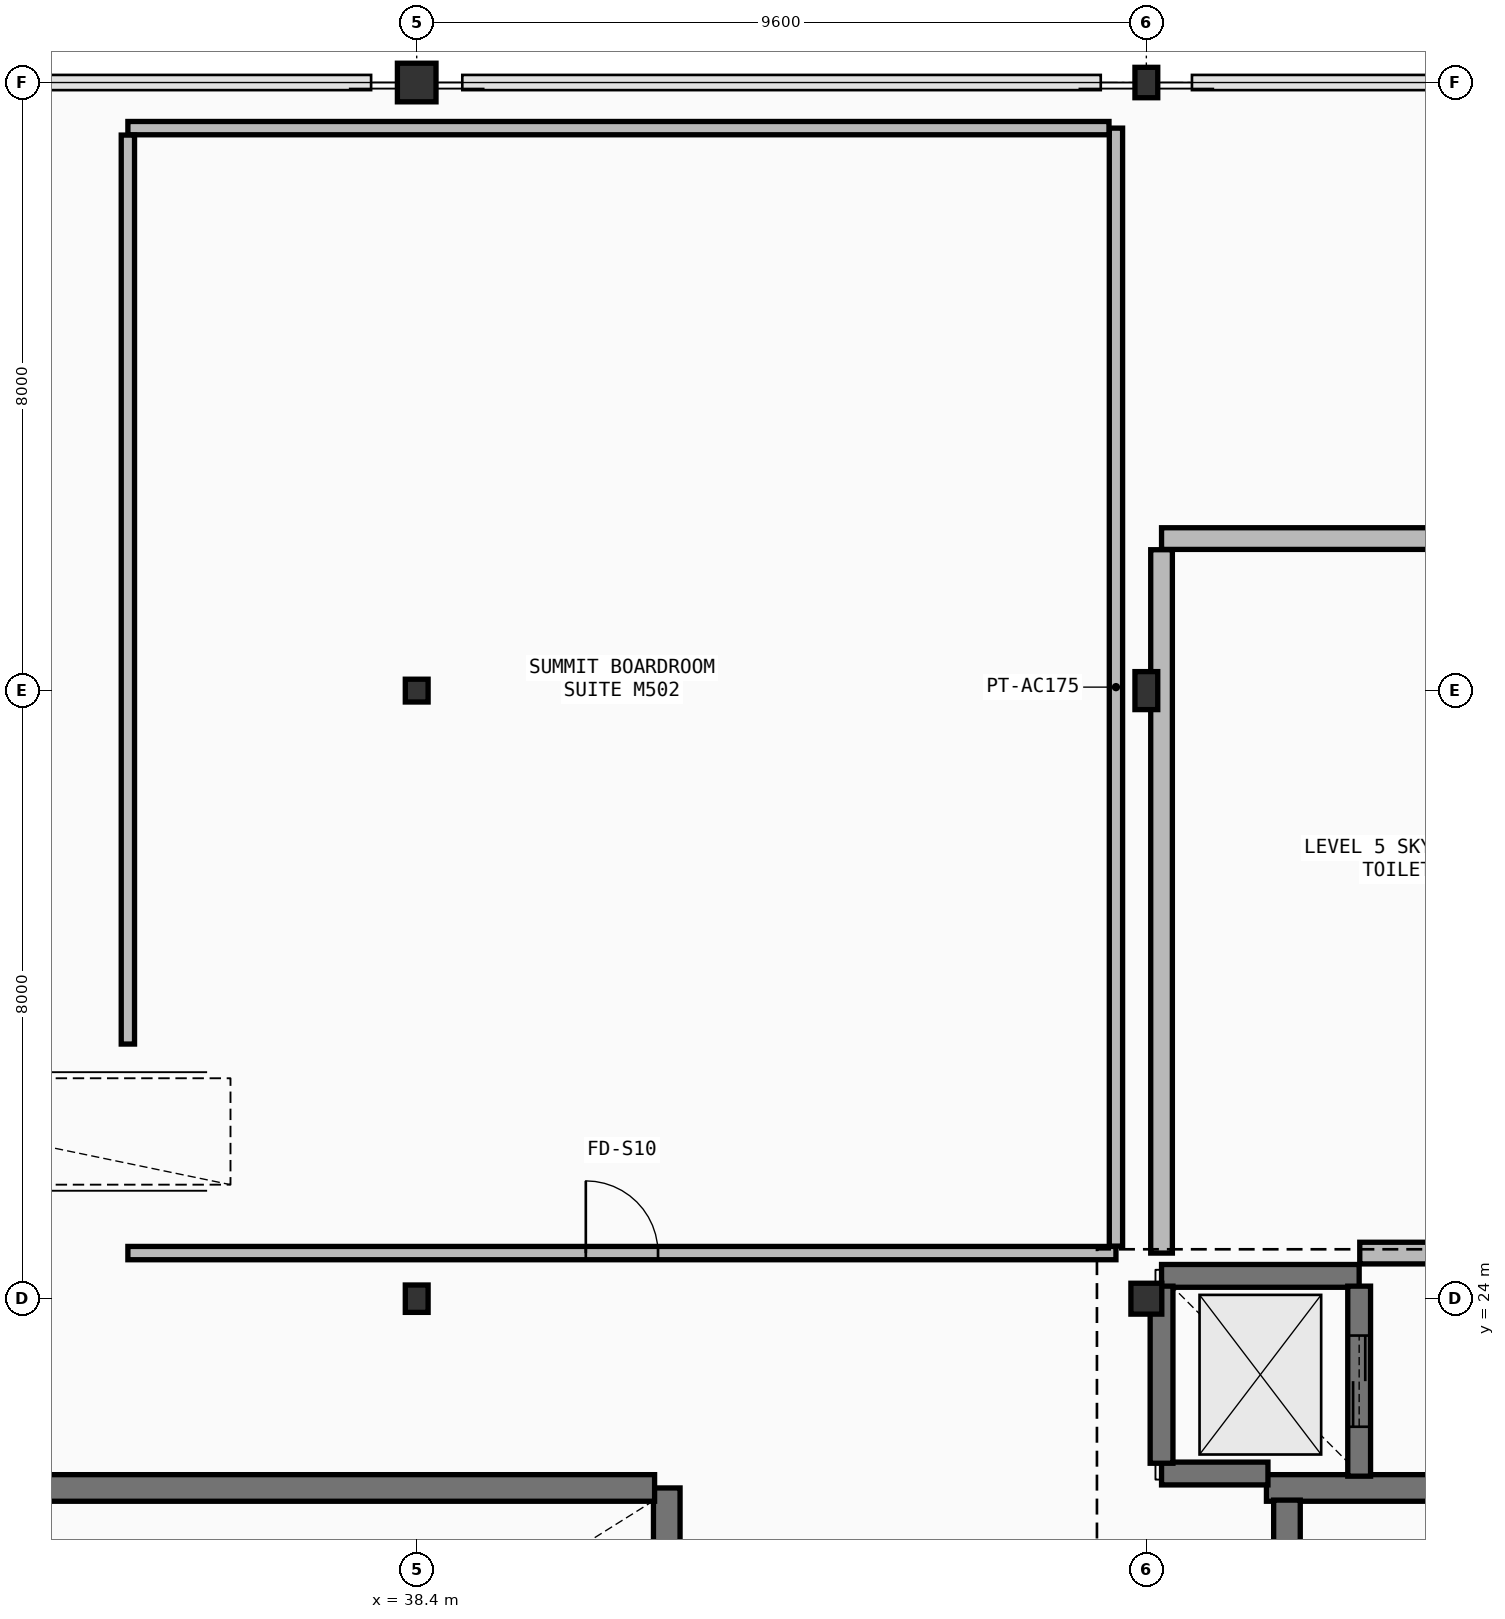
"""IFC4 building model, lengths in metres.
Left out: names, types, materials, properties, quantities, classifications, styles, units other than length and angle.
Written with IfcOpenShell. Run it as: python <this file> out.ifc"""

import sys

from ifc_helpers import new_model, si_unit, direction, frame, frame_2d, origin, origin_2d, place, context, subcontext, project, spatial, rectangle, hollow_circle, i_section, extrude, element, fill, save


model = new_model("IFC4")
c1 = context("Model", 3, precision=1e-05, world=origin(), true_north=direction((0.0, 1.0)))
c2 = subcontext(c1, "Body", "Model", "MODEL_VIEW")
j1 = project(units=[si_unit("LENGTHUNIT", "METRE"), si_unit("PLANEANGLEUNIT", "RADIAN")], contexts=[c1])
p1 = place(None, origin())
s1 = spatial("IfcSite", under=j1, at=p1, CompositionType="ELEMENT")
p2 = place(p1, origin())
s2 = spatial("IfcBuilding", under=s1, at=p2, CompositionType="ELEMENT")
p3 = place(p2, frame((0.0, 0.0, 24.9)))
s3 = spatial("IfcBuildingStorey", under=s2, at=p3, CompositionType="ELEMENT", Elevation=24.9)
p4 = place(p3, frame((38.4, 24.0, 0.0), z_axis=(0.0, 0.0, 1.0), x_axis=(1.0, 0.0, 0.0)))
e1 = element("IfcColumn", 1, at=p4, inside=s3, PredefinedType="COLUMN", context=c2, shape_type="SweptSolid", body=[
    extrude(i_section(OverallWidth=0.3, OverallDepth=0.36, WebThickness=0.012, FlangeThickness=0.022, FilletRadius=0.027, at=origin_2d()), origin(), (0.0, 0.0, 1.0), 4.5),
])
p5 = place(p3, frame((38.4, 32.0, 0.0), z_axis=(0.0, 0.0, 1.0), x_axis=(1.0, 0.0, 0.0)))
e2 = element("IfcColumn", 2, at=p5, inside=s3, PredefinedType="COLUMN", context=c2, shape_type="SweptSolid", body=[
    extrude(i_section(OverallWidth=0.3, OverallDepth=0.3, WebThickness=0.011, FlangeThickness=0.019, FilletRadius=0.027, at=origin_2d()), origin(), (0.0, 0.0, 1.0), 4.5),
])
p6 = place(p3, frame((38.4, 40.0, 0.0), z_axis=(0.0, 0.0, 1.0), x_axis=(1.0, 0.0, 0.0)))
e3 = element("IfcColumn", 3, at=p6, inside=s3, PredefinedType="COLUMN", context=c2, shape_type="SweptSolid", body=[
    extrude(hollow_circle(Radius=0.254, WallThickness=0.025, at=origin_2d()), origin(), (0.0, 0.0, 1.0), 4.5),
])
p7 = place(p3, frame((48.0, 24.0, 0.0), z_axis=(0.0, 0.0, 1.0), x_axis=(1.0, 0.0, 0.0)))
e4 = element("IfcColumn", 4, at=p7, inside=s3, PredefinedType="COLUMN", context=c2, shape_type="SweptSolid", body=[
    extrude(hollow_circle(Radius=0.203, WallThickness=0.02, at=origin_2d()), origin(), (0.0, 0.0, 1.0), 4.5),
])
p8 = place(p3, frame((48.0, 32.0, 0.0), z_axis=(0.0, 0.0, 1.0), x_axis=(1.0, 0.0, 0.0)))
e5 = element("IfcColumn", 5, at=p8, inside=s3, PredefinedType="COLUMN", context=c2, shape_type="SweptSolid", body=[
    extrude(i_section(OverallWidth=0.3, OverallDepth=0.5, WebThickness=0.014, FlangeThickness=0.028, FilletRadius=0.027, at=origin_2d()), origin(), (0.0, 0.0, 1.0), 4.5),
])
p9 = place(p3, frame((48.0, 40.0, 0.0), z_axis=(0.0, 0.0, 1.0), x_axis=(1.0, 0.0, 0.0)))
e6 = element("IfcColumn", 6, at=p9, inside=s3, PredefinedType="COLUMN", context=c2, shape_type="SweptSolid", body=[
    extrude(i_section(OverallWidth=0.3, OverallDepth=0.4, WebThickness=0.013, FlangeThickness=0.024, FilletRadius=0.027, at=origin_2d()), origin(), (0.0, 0.0, 1.0), 4.5),
])
p10 = place(p3, frame((60.73, 21.51, 0.0), z_axis=(0.0, 0.0, 1.0), x_axis=(-1.0, 0.0, 0.0)))
e7 = element("IfcWall", 7, at=p10, inside=s3, PredefinedType="SHEAR", context=c2, shape_type="SweptSolid", body=[
    extrude(rectangle(XDim=11.15, YDim=0.35, at=frame_2d((5.575, 0.0))), origin(), (0.0, 0.0, 1.0), 4.27),
])
p11 = place(p3, frame((49.85, 21.35, 0.0), z_axis=(0.0, 0.0, 1.0), x_axis=(0.0, -1.0, 0.0)))
e8 = element("IfcWall", 8, at=p11, inside=s3, PredefinedType="SHEAR", context=c2, shape_type="SweptSolid", body=[
    extrude(rectangle(XDim=5.14, YDim=0.35, at=frame_2d((2.57, 0.0))), origin(), (0.0, 0.0, 1.0), 4.27),
])
p12 = place(p3, frame((41.69, 16.21, 0.0), z_axis=(0.0, 0.0, 1.0), x_axis=(0.0, 1.0, 0.0)))
e9 = element("IfcWall", 9, at=p12, inside=s3, PredefinedType="SHEAR", context=c2, shape_type="SweptSolid", body=[
    extrude(rectangle(XDim=5.3, YDim=0.35, at=frame_2d((2.65, 0.0))), origin(), (0.0, 0.0, 1.0), 4.27),
])
p13 = place(p3, frame((41.53, 21.51, 0.0), z_axis=(0.0, 0.0, 1.0), x_axis=(-1.0, 0.0, 0.0)))
e10 = element("IfcWall", 10, at=p13, inside=s3, PredefinedType="SHEAR", context=c2, shape_type="SweptSolid", body=[
    extrude(rectangle(XDim=10.88, YDim=0.35, at=frame_2d((5.44, 0.0))), origin(), (0.0, 0.0, 1.0), 4.27),
])
p14 = place(p3, frame((50.8, 24.3, 0.0), z_axis=(0.0, 0.0, 1.0), x_axis=(-1.0, 0.0, 0.0)))
e11 = element("IfcWall", 11, at=p14, inside=s3, PredefinedType="SHEAR", context=c2, shape_type="SweptSolid", body=[
    extrude(rectangle(XDim=2.6, YDim=0.3, at=frame_2d((1.3, 0.0))), origin(), (0.0, 0.0, 1.0), 4.27),
])
p15 = place(p3, frame((48.2, 21.7, 0.0), z_axis=(0.0, 0.0, 1.0), x_axis=(1.0, 0.0, 0.0)))
e12 = element("IfcWall", 12, at=p15, inside=s3, PredefinedType="SHEAR", context=c2, shape_type="SweptSolid", body=[
    extrude(rectangle(XDim=1.4, YDim=0.3, at=frame_2d((0.7, 0.0))), origin(), (0.0, 0.0, 1.0), 4.27),
])
p16 = place(p3, frame((50.8, 21.665, 0.0), z_axis=(0.0, 0.0, 1.0), x_axis=(0.0, 1.0, 0.0)))
e13 = element("IfcWall", 13, at=p16, inside=s3, PredefinedType="SHEAR", context=c2, shape_type="SweptSolid", body=[
    extrude(rectangle(XDim=2.5, YDim=0.3, at=frame_2d((1.25, 0.0))), origin(), (0.0, 0.0, 1.0), 4.27),
])
p17 = place(p16, frame((0.65, 0.0, 0.0)))
e14 = element("IfcOpeningElement", 14, at=p17, cuts=e13, PredefinedType="OPENING", context=c2, shape_type="SweptSolid", body=[
    extrude(rectangle(XDim=1.2, YDim=2.2, at=frame_2d((0.6, 1.1))), frame((0.0, 0.16, 0.0), z_axis=(0.0, -1.0, 0.0), x_axis=(1.0, 0.0, 0.0)), (0.0, 0.0, 1.0), 0.32),
])
p18 = place(p3, frame((48.2, 24.165, 0.0), z_axis=(0.0, 0.0, 1.0), x_axis=(0.0, -1.0, 0.0)))
e15 = element("IfcWall", 15, at=p18, inside=s3, PredefinedType="SHEAR", context=c2, shape_type="SweptSolid", body=[
    extrude(rectangle(XDim=2.33, YDim=0.3, at=frame_2d((1.165, 0.0))), origin(), (0.0, 0.0, 1.0), 4.27),
])
p19 = place(p3, frame((34.6, 24.6, 0.0), z_axis=(0.0, 0.0, 1.0), x_axis=(1.0, 0.0, 0.0)))
e16 = element("IfcWall", 16, at=p19, inside=s3, PredefinedType="PARTITIONING", context=c2, shape_type="SweptSolid", body=[
    extrude(rectangle(XDim=13.0, YDim=0.175, at=frame_2d((6.5, 0.0))), origin(), (0.0, 0.0, 1.0), 3.64),
])
p20 = place(p19, frame((6.025, 0.0, 0.0)))
e17 = element("IfcOpeningElement", 17, at=p20, cuts=e16, PredefinedType="OPENING", context=c2, shape_type="SweptSolid", body=[
    extrude(rectangle(XDim=0.95, YDim=2.18, at=frame_2d((0.475, 1.09))), frame((0.0, 0.097, 0.0), z_axis=(0.0, -1.0, 0.0), x_axis=(1.0, 0.0, 0.0)), (0.0, 0.0, 1.0), 0.195),
])
p21 = place(p3, frame((47.6, 24.691, 0.0), z_axis=(0.0, 0.0, 1.0), x_axis=(0.0, 1.0, 0.0)))
e18 = element("IfcWall", 18, at=p21, inside=s3, PredefinedType="PARTITIONING", context=c2, shape_type="SweptSolid", body=[
    extrude(rectangle(XDim=14.708, YDim=0.175, at=frame_2d((7.354, 0.0))), origin(), (0.0, 0.0, 1.0), 3.68),
])
p22 = place(p3, frame((47.509, 39.4, 0.0), z_axis=(0.0, 0.0, 1.0), x_axis=(-1.0, 0.0, 0.0)))
e19 = element("IfcWall", 19, at=p22, inside=s3, PredefinedType="PARTITIONING", context=c2, shape_type="SweptSolid", body=[
    extrude(rectangle(XDim=12.908, YDim=0.175, at=frame_2d((6.454, 0.0))), origin(), (0.0, 0.0, 1.0), 3.73),
])
p23 = place(p3, frame((34.6, 39.309, 0.0), z_axis=(0.0, 0.0, 1.0), x_axis=(0.0, -1.0, 0.0)))
e20 = element("IfcWall", 20, at=p23, inside=s3, PredefinedType="PARTITIONING", context=c2, shape_type="SweptSolid", body=[
    extrude(rectangle(XDim=11.958, YDim=0.175, at=frame_2d((5.979, 0.0))), origin(), (0.0, 0.0, 1.0), 3.63),
])
p24 = place(p3, frame((50.808, 24.6, 0.0), z_axis=(0.0, 0.0, 1.0), x_axis=(1.0, 0.0, 0.0)))
e21 = element("IfcWall", 21, at=p24, inside=s3, PredefinedType="PLUMBINGWALL", context=c2, shape_type="SweptSolid", body=[
    extrude(rectangle(XDim=3.592, YDim=0.285, at=frame_2d((1.796, 0.0))), origin(), (0.0, 0.0, 1.0), 4.27),
])
p25 = place(p24, frame((1.477, 0.0, 0.0)))
e22 = element("IfcOpeningElement", 22, at=p25, cuts=e21, PredefinedType="OPENING", context=c2, shape_type="SweptSolid", body=[
    extrude(rectangle(XDim=1.13, YDim=2.3, at=frame_2d((0.565, 1.15))), frame((0.0, 0.152, 0.0), z_axis=(0.0, -1.0, 0.0), x_axis=(1.0, 0.0, 0.0)), (0.0, 0.0, 1.0), 0.305),
])
p26 = place(p3, frame((54.253, 34.0, 0.0), z_axis=(0.0, 0.0, 1.0), x_axis=(-1.0, 0.0, 0.0)))
e23 = element("IfcWall", 23, at=p26, inside=s3, PredefinedType="PLUMBINGWALL", context=c2, shape_type="SweptSolid", body=[
    extrude(rectangle(XDim=6.053, YDim=0.285, at=frame_2d((3.027, 0.0))), origin(), (0.0, 0.0, 1.0), 4.26),
])
p27 = place(p3, frame((48.2, 33.854, 0.0), z_axis=(0.0, 0.0, 1.0), x_axis=(0.0, -1.0, 0.0)))
e24 = element("IfcWall", 24, at=p27, inside=s3, PredefinedType="PLUMBINGWALL", context=c2, shape_type="SweptSolid", body=[
    extrude(rectangle(XDim=9.253, YDim=0.285, at=frame_2d((4.627, 0.0))), origin(), (0.0, 0.0, 1.0), 3.63),
])
p28 = place(p17, origin())
e25 = element("IfcDoor", 25, at=p28, inside=s3, OperationType="DOUBLE_DOOR_SLIDING", PredefinedType="DOOR", context=c2, shape_type="SweptSolid", body=[
    extrude(rectangle(XDim=1.2, YDim=2.2, at=frame_2d((0.6, 1.1))), frame((0.0, 0.025, 0.0), z_axis=(0.0, -1.0, 0.0), x_axis=(1.0, 0.0, 0.0)), (0.0, 0.0, 1.0), 0.05),
])
fill(e14, e25)
p29 = place(p20, origin())
e26 = element("IfcDoor", 26, at=p29, inside=s3, OperationType="SINGLE_SWING_LEFT", PredefinedType="DOOR", context=c2, shape_type="SweptSolid", body=[
    extrude(rectangle(XDim=0.95, YDim=2.18, at=frame_2d((0.475, 1.09))), frame((0.0, 0.025, 0.0), z_axis=(0.0, -1.0, 0.0), x_axis=(1.0, 0.0, 0.0)), (0.0, 0.0, 1.0), 0.05),
])
fill(e17, e26)
save(model, sys.argv[1])
